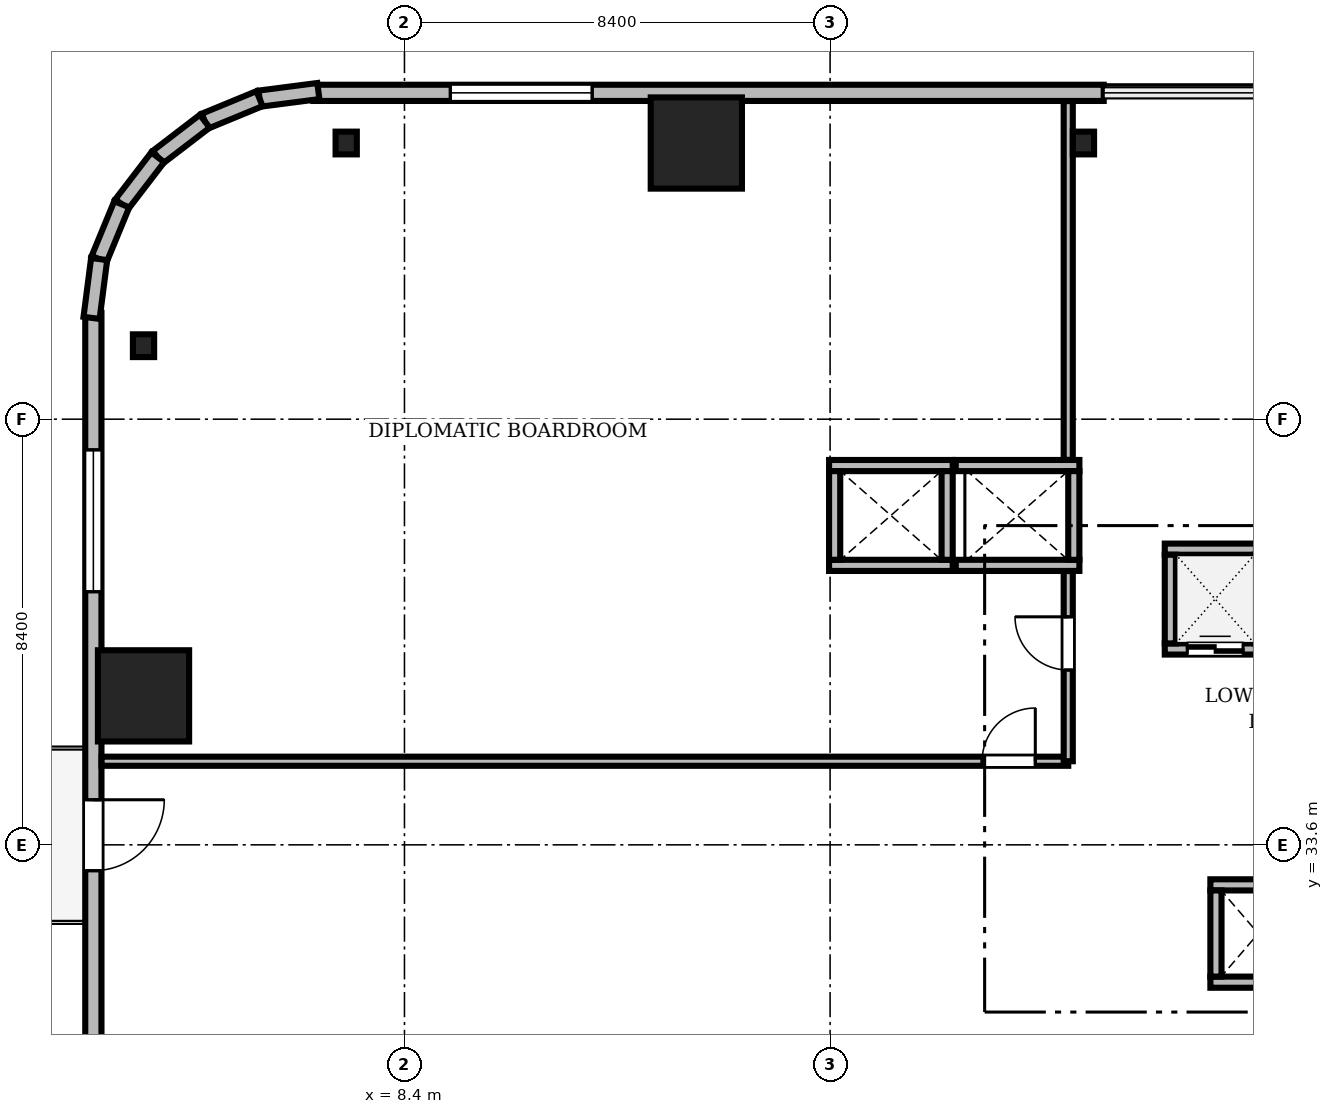
"""IFC4 building model, lengths in metres.
Left out: names, types, materials, properties, quantities, classifications, styles, units other than length and angle.
Written with IfcOpenShell. Run it as: python <this file> out.ifc"""

import sys

from ifc_helpers import new_model, si_unit, direction, frame, frame_2d, origin, origin_2d, place, context, subcontext, project, spatial, rectangle, i_section, extrude, source, transform, mapped, element, fill, save


model = new_model("IFC4")
c1 = context("Model", 3, precision=1e-05, world=origin(), true_north=direction((0.0, 1.0)))
c2 = subcontext(c1, "Body", "Model", "MODEL_VIEW")
j1 = project(units=[si_unit("LENGTHUNIT", "METRE"), si_unit("PLANEANGLEUNIT", "RADIAN")], contexts=[c1])
p1 = place(None, origin())
s1 = spatial("IfcSite", under=j1, at=p1, CompositionType="ELEMENT")
p2 = place(p1, origin())
s2 = spatial("IfcBuilding", under=s1, at=p2, CompositionType="ELEMENT")
p3 = place(p2, frame((0.0, 0.0, 27.6)))
s3 = spatial("IfcBuildingStorey", under=s2, at=p3, CompositionType="ELEMENT", Elevation=27.6)
m1 = source(origin(), c2, "Body", "SweptSolid", [
    extrude(rectangle(XDim=1.8, YDim=1.8, at=origin_2d()), origin(), (0.0, 0.0, 1.0), 3.41),
])
for number, where, z_axis, x_axis in (
    (1, (14.16, 47.45, 0.0), (0.0, 0.0, 1.0), (1.0, 0.0, 0.0)),
    (2, (3.25, 36.54, 0.0), (0.0, 0.0, 1.0), (1.0, 0.0, 0.0)),
):
    element("IfcColumn", number, at=place(p3, frame(where, z_axis=z_axis, x_axis=x_axis)), inside=s3, PredefinedType="COLUMN", context=c2, shape_type="MappedRepresentation", body=[
        mapped(m1, transform((0.0, 0.0, 0.0), scale=1.0)),
    ])
m2 = source(origin(), c2, "Body", "SweptSolid", [
    extrude(i_section(OverallWidth=0.419, OverallDepth=0.449, WebThickness=0.031, FlangeThickness=0.048, FilletRadius=0.015, at=origin_2d()), origin(), (0.0, 0.0, 1.0), 3.41),
])
for number, where, z_axis, x_axis in (
    (3, (21.8, 47.45, 0.0), (0.0, 0.0, 1.0), (1.0, 0.0, 0.0)),
    (4, (7.25, 47.45, 0.0), (0.0, 0.0, 1.0), (1.0, 0.0, 0.0)),
    (5, (3.25, 43.45, 0.0), (0.0, 0.0, 1.0), (1.0, 0.0, 0.0)),
):
    element("IfcColumn", number, at=place(p3, frame(where, z_axis=z_axis, x_axis=x_axis)), inside=s3, PredefinedType="COLUMN", context=c2, shape_type="MappedRepresentation", body=[
        mapped(m2, transform((0.0, 0.0, 0.0), scale=1.0)),
    ])
m3 = source(origin(), c2, "Body", "SweptSolid", [
    extrude(rectangle(XDim=15.6, YDim=0.32, at=frame_2d((7.8, 0.0))), origin(), (0.0, 0.0, 1.0), 3.41),
])
p4 = place(p3, frame((22.2, 48.44, 0.0), z_axis=(0.0, 0.0, 1.0), x_axis=(-1.0, 0.0, 0.0)))
e6 = element("IfcWall", 6, at=p4, inside=s3, PredefinedType="SOLIDWALL", context=c2, shape_type="MappedRepresentation", body=[
    mapped(m3, transform((0.0, 0.0, 0.0), scale=1.0)),
])
m4 = source(origin(), c2, "Body", "SweptSolid", [
    extrude(rectangle(XDim=2.8, YDim=2.4, at=frame_2d((1.4, 1.2))), frame((0.0, 0.17, 0.0), z_axis=(0.0, -1.0, 0.0), x_axis=(1.0, 0.0, 0.0)), (0.0, 0.0, 1.0), 0.34),
])
p5 = place(p4, frame((10.095, 0.0, 0.72)))
e7 = element("IfcOpeningElement", 7, at=p5, cuts=e6, PredefinedType="OPENING", context=c2, shape_type="MappedRepresentation", body=[
    mapped(m4, transform((0.0, 0.0, 0.0), scale=1.0)),
])
m5 = source(origin(), c2, "Body", "SweptSolid", [
    extrude(rectangle(XDim=15.6, YDim=0.32, at=frame_2d((7.8, 0.0))), origin(), (0.0, 0.0, 1.0), 3.41),
])
p6 = place(p3, frame((2.26, 44.1, 0.0), z_axis=(0.0, 0.0, 1.0), x_axis=(0.0, -1.0, 0.0)))
e8 = element("IfcWall", 8, at=p6, inside=s3, PredefinedType="SOLIDWALL", context=c2, shape_type="MappedRepresentation", body=[
    mapped(m5, transform((0.0, 0.0, 0.0), scale=1.0)),
])
m6 = source(origin(), c2, "Body", "SweptSolid", [
    extrude(rectangle(XDim=1.4, YDim=2.3, at=frame_2d((0.7, 1.15))), frame((0.0, 0.17, 0.0), z_axis=(0.0, -1.0, 0.0), x_axis=(1.0, 0.0, 0.0)), (0.0, 0.0, 1.0), 0.34),
])
p7 = place(p6, frame((9.61, 0.0, 0.0)))
e9 = element("IfcOpeningElement", 9, at=p7, cuts=e8, PredefinedType="OPENING", context=c2, shape_type="MappedRepresentation", body=[
    mapped(m6, transform((0.0, 0.0, 0.0), scale=1.0)),
])
p8 = place(p6, frame((2.705, 0.0, 0.72)))
e10 = element("IfcOpeningElement", 10, at=p8, cuts=e8, PredefinedType="OPENING", context=c2, shape_type="MappedRepresentation", body=[
    mapped(m4, transform((0.0, 0.0, 0.0), scale=1.0)),
])
m7 = source(origin(), c2, "Body", "SweptSolid", [
    extrude(rectangle(XDim=1.17, YDim=0.32, at=frame_2d((0.585, 0.0))), origin(), (0.0, 0.0, 1.0), 3.41),
])
p9 = place(p3, frame((6.7, 48.476, 0.0), z_axis=(0.0, 0.0, 1.0), x_axis=(-0.991735963317, -0.128295670475, 0.0)))
e11 = element("IfcWall", 11, at=p9, inside=s3, PredefinedType="SOLIDWALL", context=c2, shape_type="MappedRepresentation", body=[
    mapped(m7, transform((0.0, 0.0, 0.0), scale=1.0)),
])
m8 = source(origin(), c2, "Body", "SweptSolid", [
    extrude(rectangle(XDim=1.169, YDim=0.32, at=frame_2d((0.584, 0.0))), origin(), (0.0, 0.0, 1.0), 3.41),
])
p10 = place(p3, frame((5.54, 48.325, 0.0), z_axis=(0.0, 0.0, 1.0), x_axis=(-0.924552646638, -0.381054331552, 0.0)))
e12 = element("IfcWall", 12, at=p10, inside=s3, PredefinedType="SOLIDWALL", context=c2, shape_type="MappedRepresentation", body=[
    mapped(m8, transform((0.0, 0.0, 0.0), scale=1.0)),
])
m9 = source(origin(), c2, "Body", "SweptSolid", [
    extrude(rectangle(XDim=1.169, YDim=0.32, at=frame_2d((0.584, 0.0))), origin(), (0.0, 0.0, 1.0), 3.41),
])
p11 = place(p3, frame((4.459, 47.88, 0.0), z_axis=(0.0, 0.0, 1.0), x_axis=(-0.793663520347, -0.608356981114, 0.0)))
e13 = element("IfcWall", 13, at=p11, inside=s3, PredefinedType="SOLIDWALL", context=c2, shape_type="MappedRepresentation", body=[
    mapped(m9, transform((0.0, 0.0, 0.0), scale=1.0)),
])
m10 = source(origin(), c2, "Body", "SweptSolid", [
    extrude(rectangle(XDim=1.169, YDim=0.32, at=frame_2d((0.584, 0.0))), origin(), (0.0, 0.0, 1.0), 3.41),
])
p12 = place(p3, frame((3.531, 47.169, 0.0), z_axis=(0.0, 0.0, 1.0), x_axis=(-0.608387696831, -0.793639975269, 0.0)))
e14 = element("IfcWall", 14, at=p12, inside=s3, PredefinedType="SOLIDWALL", context=c2, shape_type="MappedRepresentation", body=[
    mapped(m10, transform((0.0, 0.0, 0.0), scale=1.0)),
])
p13 = place(p3, frame((2.82, 46.241, 0.0), z_axis=(0.0, 0.0, 1.0), x_axis=(-0.381054331552, -0.924552646638, 0.0)))
e15 = element("IfcWall", 15, at=p13, inside=s3, PredefinedType="SOLIDWALL", context=c2, shape_type="MappedRepresentation", body=[
    mapped(m8, transform((0.0, 0.0, 0.0), scale=1.0)),
])
p14 = place(p3, frame((2.375, 45.16, 0.0), z_axis=(0.0, 0.0, 1.0), x_axis=(-0.128295670475, -0.991735963317, 0.0)))
e16 = element("IfcWall", 16, at=p14, inside=s3, PredefinedType="SOLIDWALL", context=c2, shape_type="MappedRepresentation", body=[
    mapped(m7, transform((0.0, 0.0, 0.0), scale=1.0)),
])
m11 = source(origin(), c2, "Body", "SweptSolid", [
    extrude(rectangle(XDim=2.44, YDim=0.22, at=frame_2d((1.22, 0.0))), origin(), (0.0, 0.0, 1.0), 3.41),
])
for number, where, z_axis, x_axis in (
    (17, (16.78, 39.115, 0.0), (0.0, 0.0, 1.0), (1.0, 0.0, 0.0)),
    (18, (16.78, 41.085, 0.0), (0.0, 0.0, 1.0), (1.0, 0.0, 0.0)),
):
    element("IfcWall", number, at=place(p3, frame(where, z_axis=z_axis, x_axis=x_axis)), inside=s3, PredefinedType="SOLIDWALL", context=c2, shape_type="MappedRepresentation", body=[
        mapped(m11, transform((0.0, 0.0, 0.0), scale=1.0)),
    ])
m12 = source(origin(), c2, "Body", "SweptSolid", [
    extrude(rectangle(XDim=1.75, YDim=0.22, at=frame_2d((0.875, 0.0))), origin(), (0.0, 0.0, 1.0), 3.41),
])
for number, where, z_axis, x_axis in (
    (19, (16.89, 39.225, 0.0), (0.0, 0.0, 1.0), (0.0, 1.0, 0.0)),
    (20, (19.11, 39.225, 0.0), (0.0, 0.0, 1.0), (0.0, 1.0, 0.0)),
):
    element("IfcWall", number, at=place(p3, frame(where, z_axis=z_axis, x_axis=x_axis)), inside=s3, PredefinedType="SOLIDWALL", context=c2, shape_type="MappedRepresentation", body=[
        mapped(m12, transform((0.0, 0.0, 0.0), scale=1.0)),
    ])
for number, where, z_axis, x_axis in (
    (21, (19.28, 39.115, 0.0), (0.0, 0.0, 1.0), (1.0, 0.0, 0.0)),
    (22, (19.28, 41.085, 0.0), (0.0, 0.0, 1.0), (1.0, 0.0, 0.0)),
):
    element("IfcWall", number, at=place(p3, frame(where, z_axis=z_axis, x_axis=x_axis)), inside=s3, PredefinedType="SOLIDWALL", context=c2, shape_type="MappedRepresentation", body=[
        mapped(m11, transform((0.0, 0.0, 0.0), scale=1.0)),
    ])
p15 = place(p3, frame((21.61, 39.225, 0.0), z_axis=(0.0, 0.0, 1.0), x_axis=(0.0, 1.0, 0.0)))
e23 = element("IfcWall", 23, at=p15, inside=s3, PredefinedType="SOLIDWALL", context=c2, shape_type="MappedRepresentation", body=[
    mapped(m12, transform((0.0, 0.0, 0.0), scale=1.0)),
])
m13 = source(origin(), c2, "Body", "SweptSolid", [
    extrude(rectangle(XDim=1.99, YDim=0.22, at=frame_2d((0.995, 0.0))), origin(), (0.0, 0.0, 1.0), 3.41),
])
p16 = place(p3, frame((23.405, 37.465, 0.0), z_axis=(0.0, 0.0, 1.0), x_axis=(1.0, 0.0, 0.0)))
e24 = element("IfcWall", 24, at=p16, inside=s3, PredefinedType="SOLIDWALL", context=c2, shape_type="MappedRepresentation", body=[
    mapped(m13, transform((0.0, 0.0, 0.0), scale=1.0)),
])
m14 = source(origin(), c2, "Body", "SweptSolid", [
    extrude(rectangle(XDim=1.1, YDim=2.2, at=frame_2d((0.55, 1.1))), frame((0.0, 0.12, 0.0), z_axis=(0.0, -1.0, 0.0), x_axis=(1.0, 0.0, 0.0)), (0.0, 0.0, 1.0), 0.24),
])
p17 = place(p16, frame((0.445, 0.0, 0.0)))
e25 = element("IfcOpeningElement", 25, at=p17, cuts=e24, PredefinedType="OPENING", context=c2, shape_type="MappedRepresentation", body=[
    mapped(m14, transform((0.0, 0.0, 0.0), scale=1.0)),
])
p18 = place(p3, frame((23.405, 39.435, 0.0), z_axis=(0.0, 0.0, 1.0), x_axis=(1.0, 0.0, 0.0)))
e26 = element("IfcWall", 26, at=p18, inside=s3, PredefinedType="SOLIDWALL", context=c2, shape_type="MappedRepresentation", body=[
    mapped(m13, transform((0.0, 0.0, 0.0), scale=1.0)),
])
p19 = place(p3, frame((23.515, 37.575, 0.0), z_axis=(0.0, 0.0, 1.0), x_axis=(0.0, 1.0, 0.0)))
e27 = element("IfcWall", 27, at=p19, inside=s3, PredefinedType="SOLIDWALL", context=c2, shape_type="MappedRepresentation", body=[
    mapped(m12, transform((0.0, 0.0, 0.0), scale=1.0)),
])
m15 = source(origin(), c2, "Body", "SweptSolid", [
    extrude(rectangle(XDim=1.89, YDim=0.22, at=frame_2d((0.945, 0.0))), origin(), (0.0, 0.0, 1.0), 3.41),
])
for number, where, z_axis, x_axis in (
    (28, (24.305, 30.89, 0.0), (0.0, 0.0, 1.0), (1.0, 0.0, 0.0)),
    (29, (24.305, 32.81, 0.0), (0.0, 0.0, 1.0), (1.0, 0.0, 0.0)),
):
    element("IfcWall", number, at=place(p3, frame(where, z_axis=z_axis, x_axis=x_axis)), inside=s3, PredefinedType="SOLIDWALL", context=c2, shape_type="MappedRepresentation", body=[
        mapped(m15, transform((0.0, 0.0, 0.0), scale=1.0)),
    ])
m16 = source(origin(), c2, "Body", "SweptSolid", [
    extrude(rectangle(XDim=1.7, YDim=0.22, at=frame_2d((0.85, 0.0))), origin(), (0.0, 0.0, 1.0), 3.41),
])
p20 = place(p3, frame((24.415, 31.0, 0.0), z_axis=(0.0, 0.0, 1.0), x_axis=(0.0, 1.0, 0.0)))
e30 = element("IfcWall", 30, at=p20, inside=s3, PredefinedType="SOLIDWALL", context=c2, shape_type="MappedRepresentation", body=[
    mapped(m16, transform((0.0, 0.0, 0.0), scale=1.0)),
])
m17 = source(origin(), c2, "Body", "SweptSolid", [
    extrude(rectangle(XDim=19.078, YDim=0.18, at=frame_2d((9.539, 0.0))), origin(), (0.0, 0.0, 1.0), 2.652),
])
p21 = place(p3, frame((2.422, 35.25, 0.0), z_axis=(0.0, 0.0, 1.0), x_axis=(1.0, 0.0, 0.0)))
e31 = element("IfcWall", 31, at=p21, inside=s3, PredefinedType="PARTITIONING", context=c2, shape_type="MappedRepresentation", body=[
    mapped(m17, transform((0.0, 0.0, 0.0), scale=1.0)),
])
m18 = source(origin(), c2, "Body", "SweptSolid", [
    extrude(rectangle(XDim=1.05, YDim=2.2, at=frame_2d((0.525, 1.1))), frame((0.0, 0.1, 0.0), z_axis=(0.0, -1.0, 0.0), x_axis=(1.0, 0.0, 0.0)), (0.0, 0.0, 1.0), 0.2),
])
p22 = place(p21, frame((17.378, 0.0, 0.0)))
e32 = element("IfcOpeningElement", 32, at=p22, cuts=e31, PredefinedType="OPENING", context=c2, shape_type="MappedRepresentation", body=[
    mapped(m18, transform((0.0, 0.0, 0.0), scale=1.0)),
])
m19 = source(origin(), c2, "Body", "SweptSolid", [
    extrude(rectangle(XDim=3.753, YDim=0.18, at=frame_2d((1.876, 0.0))), origin(), (0.0, 0.0, 1.0), 3.41),
])
p23 = place(p3, frame((21.5, 35.25, 0.0), z_axis=(0.0, 0.0, 1.0), x_axis=(0.0, 1.0, 0.0)))
e33 = element("IfcWall", 33, at=p23, inside=s3, PredefinedType="PARTITIONING", context=c2, shape_type="MappedRepresentation", body=[
    mapped(m19, transform((0.0, 0.0, 0.0), scale=1.0)),
])
p24 = place(p23, frame((1.8, 0.0, 0.0)))
e34 = element("IfcOpeningElement", 34, at=p24, cuts=e33, PredefinedType="OPENING", context=c2, shape_type="MappedRepresentation", body=[
    mapped(m18, transform((0.0, 0.0, 0.0), scale=1.0)),
])
m20 = source(origin(), c2, "Body", "SweptSolid", [
    extrude(rectangle(XDim=7.081, YDim=0.18, at=frame_2d((3.541, 0.0))), origin(), (0.0, 0.0, 1.0), 2.652),
])
p25 = place(p3, frame((21.5, 41.197, 0.0), z_axis=(0.0, 0.0, 1.0), x_axis=(0.0, 1.0, 0.0)))
e35 = element("IfcWall", 35, at=p25, inside=s3, PredefinedType="PARTITIONING", context=c2, shape_type="MappedRepresentation", body=[
    mapped(m20, transform((0.0, 0.0, 0.0), scale=1.0)),
])
m21 = source(origin(), c2, "Body", "SweptSolid", [
    extrude(rectangle(XDim=2.8, YDim=2.4, at=frame_2d((1.4, 1.2))), frame((0.0, 0.03, 0.0), z_axis=(0.0, -1.0, 0.0), x_axis=(1.0, 0.0, 0.0)), (0.0, 0.0, 1.0), 0.06),
])
p26 = place(p5, origin())
e36 = element("IfcWindow", 36, at=p26, inside=s3, PartitioningType="SINGLE_PANEL", PredefinedType="WINDOW", context=c2, shape_type="MappedRepresentation", body=[
    mapped(m21, transform((0.0, 0.0, 0.0), scale=1.0)),
])
fill(e7, e36)
m22 = source(origin(), c2, "Body", "SweptSolid", [
    extrude(rectangle(XDim=1.4, YDim=2.3, at=frame_2d((0.7, 1.15))), frame((0.0, 0.025, 0.0), z_axis=(0.0, -1.0, 0.0), x_axis=(1.0, 0.0, 0.0)), (0.0, 0.0, 1.0), 0.05),
])
p27 = place(p7, frame((1.4, 0.0, 0.0), z_axis=(0.0, 0.0, 1.0), x_axis=(-1.0, 0.0, 0.0)))
e37 = element("IfcDoor", 37, at=p27, inside=s3, OperationType="DOUBLE_DOOR_SLIDING", PredefinedType="DOOR", context=c2, shape_type="MappedRepresentation", body=[
    mapped(m22, transform((0.0, 0.0, 0.0), scale=1.0)),
])
fill(e9, e37)
p28 = place(p8, origin())
e38 = element("IfcWindow", 38, at=p28, inside=s3, PartitioningType="SINGLE_PANEL", PredefinedType="WINDOW", context=c2, shape_type="MappedRepresentation", body=[
    mapped(m21, transform((0.0, 0.0, 0.0), scale=1.0)),
])
fill(e10, e38)
m23 = source(origin(), c2, "Body", "SweptSolid", [
    extrude(rectangle(XDim=1.1, YDim=2.2, at=frame_2d((0.55, 1.1))), frame((0.0, 0.025, 0.0), z_axis=(0.0, -1.0, 0.0), x_axis=(1.0, 0.0, 0.0)), (0.0, 0.0, 1.0), 0.05),
])
p29 = place(p17, origin())
e39 = element("IfcDoor", 39, at=p29, inside=s3, OperationType="DOUBLE_DOOR_SLIDING", PredefinedType="DOOR", context=c2, shape_type="MappedRepresentation", body=[
    mapped(m23, transform((0.0, 0.0, 0.0), scale=1.0)),
])
fill(e25, e39)
m24 = source(origin(), c2, "Body", "SweptSolid", [
    extrude(rectangle(XDim=1.05, YDim=2.2, at=frame_2d((0.525, 1.1))), frame((0.0, 0.025, 0.0), z_axis=(0.0, -1.0, 0.0), x_axis=(1.0, 0.0, 0.0)), (0.0, 0.0, 1.0), 0.05),
])
p30 = place(p22, origin())
e40 = element("IfcDoor", 40, at=p30, inside=s3, OperationType="SINGLE_SWING_RIGHT", PredefinedType="DOOR", context=c2, shape_type="MappedRepresentation", body=[
    mapped(m24, transform((0.0, 0.0, 0.0), scale=1.0)),
])
fill(e32, e40)
p31 = place(p24, origin())
e41 = element("IfcDoor", 41, at=p31, inside=s3, OperationType="SINGLE_SWING_RIGHT", PredefinedType="DOOR", context=c2, shape_type="MappedRepresentation", body=[
    mapped(m24, transform((0.0, 0.0, 0.0), scale=1.0)),
])
fill(e34, e41)
save(model, sys.argv[1])
